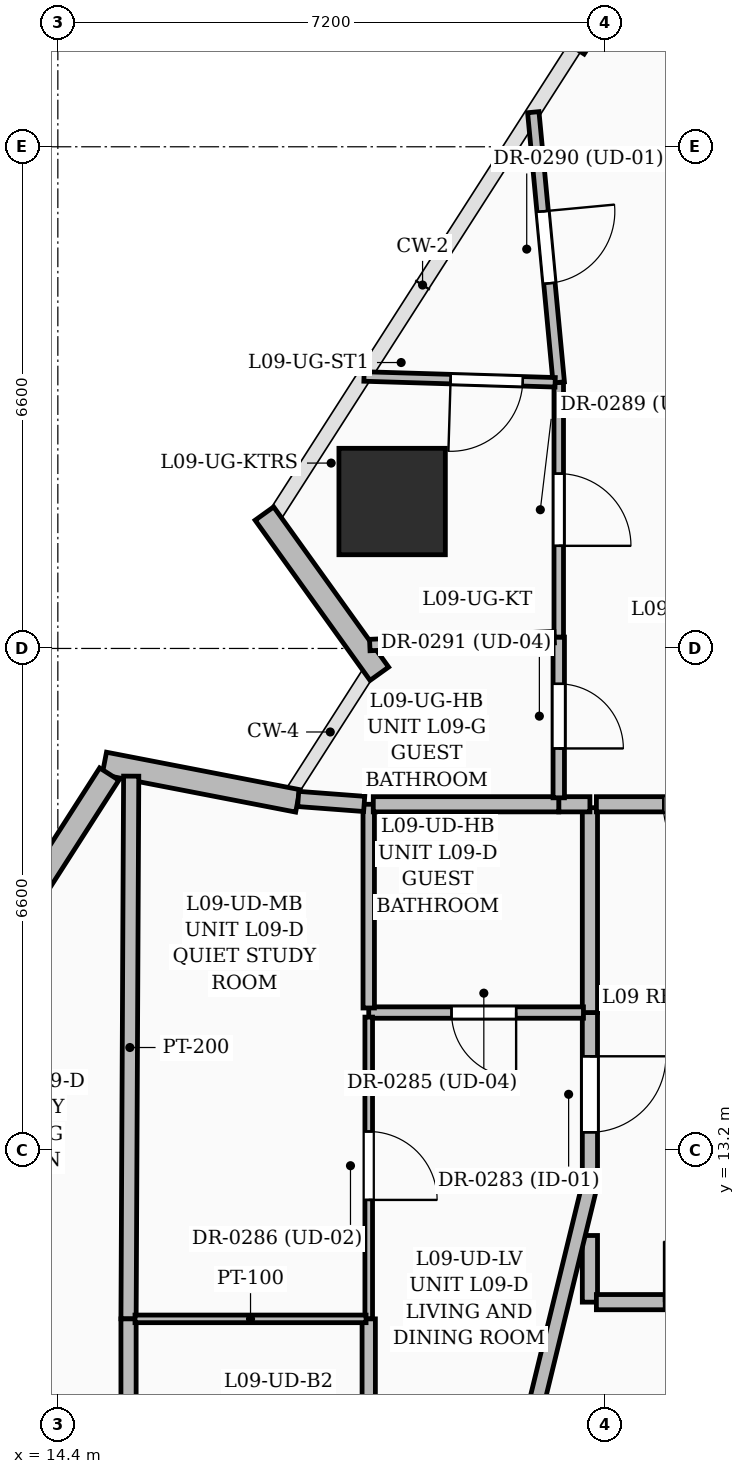
"""IFC4 building model, lengths in metres.
Left out: names, types, materials, properties, quantities, classifications, styles, units other than length and angle.
Written with IfcOpenShell. Run it as: python <this file> out.ifc"""

import sys

from ifc_helpers import new_model, si_unit, direction, frame, frame_2d, origin, origin_2d, place, context, subcontext, project, spatial, rectangle, extrude, element, fill, save


model = new_model("IFC4")
c1 = context("Model", 3, precision=1e-05, world=origin(), true_north=direction((0.0, 1.0)))
c2 = subcontext(c1, "Body", "Model", "MODEL_VIEW")
j1 = project(units=[si_unit("LENGTHUNIT", "METRE"), si_unit("PLANEANGLEUNIT", "RADIAN")], contexts=[c1])
p1 = place(None, origin())
s1 = spatial("IfcSite", under=j1, at=p1, CompositionType="ELEMENT")
p2 = place(p1, origin())
s2 = spatial("IfcBuilding", under=s1, at=p2, CompositionType="ELEMENT")
p3 = place(p2, frame((0.0, 0.0, 42.6)))
s3 = spatial("IfcBuildingStorey", under=s2, at=p3, CompositionType="ELEMENT", Elevation=42.6)
p4 = place(p3, frame((18.798, 21.733, 0.0), z_axis=(0.0, 0.0, 1.0), x_axis=(1.0, 0.0, 0.0)))
e1 = element("IfcColumn", 1, at=p4, inside=s3, PredefinedType="COLUMN", context=c2, shape_type="SweptSolid", body=[
    extrude(rectangle(XDim=1.4, YDim=1.4, at=origin_2d()), origin(), (0.0, 0.0, 1.0), 3.6),
])
p5 = place(p3, frame((15.012, 18.288, 0.0), z_axis=(0.0, 0.0, 1.0), x_axis=(0.981746971615, -0.190191702567, 0.0)))
e2 = element("IfcWall", 2, at=p5, inside=s3, PredefinedType="SOLIDWALL", context=c2, shape_type="SweptSolid", body=[
    extrude(rectangle(XDim=2.593, YDim=0.3, at=frame_2d((1.296, 0.0))), origin(), (0.0, 0.0, 1.0), 2.375),
])
p6 = place(p3, frame((18.63, 19.467, 0.0), z_axis=(0.0, 0.0, 1.0), x_axis=(-0.58299973372, 0.812472344442, 0.0)))
e3 = element("IfcWall", 3, at=p6, inside=s3, PredefinedType="SOLIDWALL", context=c2, shape_type="SweptSolid", body=[
    extrude(rectangle(XDim=2.594, YDim=0.3, at=frame_2d((1.297, 0.0))), origin(), (0.0, 0.0, 1.0), 2.375),
])
p7 = place(p3, frame((21.198, 27.701, 0.0), z_axis=(0.0, 0.0, 1.0), x_axis=(0.539535005594, 0.841963168873, 0.0)))
e4 = element("IfcWall", 4, at=p7, inside=s3, PredefinedType="SOLIDWALL", context=c2, shape_type="SweptSolid", body=[
    extrude(rectangle(XDim=7.412, YDim=0.3, at=frame_2d((3.706, 0.0))), origin(), (0.0, 0.0, 1.0), 3.35),
])
p8 = place(p7, frame((0.675, 0.0, 0.8)))
e5 = element("IfcOpeningElement", 5, at=p8, cuts=e4, PredefinedType="OPENING", context=c2, shape_type="SweptSolid", body=[
    extrude(rectangle(XDim=1.2, YDim=1.8, at=frame_2d((0.6, 0.9))), frame((0.0, 0.16, 0.0), z_axis=(0.0, -1.0, 0.0), x_axis=(1.0, 0.0, 0.0)), (0.0, 0.0, 1.0), 0.32),
])
p9 = place(p7, frame((3.45, 0.0, 0.6)))
e6 = element("IfcOpeningElement", 6, at=p9, cuts=e4, PredefinedType="OPENING", context=c2, shape_type="SweptSolid", body=[
    extrude(rectangle(XDim=2.4, YDim=2.1, at=frame_2d((1.2, 1.05))), frame((0.0, 0.16, 0.0), z_axis=(0.0, -1.0, 0.0), x_axis=(1.0, 0.0, 0.0)), (0.0, 0.0, 1.0), 0.32),
])
p10 = place(p3, frame((11.278, 12.219, 0.0), z_axis=(0.0, 0.0, 1.0), x_axis=(0.539524946774, 0.84196961454, 0.0)))
e7 = element("IfcWall", 7, at=p10, inside=s3, PredefinedType="SOLIDWALL", context=c2, shape_type="SweptSolid", body=[
    extrude(rectangle(XDim=7.041, YDim=0.3, at=frame_2d((3.52, 0.0))), origin(), (0.0, 0.0, 1.0), 3.35),
])
p11 = place(p10, frame((3.1, 0.0, 0.55)))
e8 = element("IfcOpeningElement", 8, at=p11, cuts=e7, PredefinedType="OPENING", context=c2, shape_type="SweptSolid", body=[
    extrude(rectangle(XDim=1.6, YDim=2.2, at=frame_2d((0.8, 1.1))), frame((0.0, 0.16, 0.0), z_axis=(0.0, -1.0, 0.0), x_axis=(1.0, 0.0, 0.0)), (0.0, 0.0, 1.0), 0.32),
])
p12 = place(p3, frame((21.4, 12.077, 0.0), z_axis=(0.0, 0.0, 1.0), x_axis=(0.0, -1.0, 0.0)))
e9 = element("IfcWall", 9, at=p12, inside=s3, PredefinedType="PARTITIONING", context=c2, shape_type="SweptSolid", body=[
    extrude(rectangle(XDim=0.877, YDim=0.2, at=frame_2d((0.438, 0.0))), origin(), (0.0, 0.0, 1.0), 3.35),
])
p13 = place(p3, frame((21.485, 11.2, 0.0), z_axis=(0.0, 0.0, 1.0), x_axis=(1.0, 0.0, 0.0)))
e10 = element("IfcWall", 10, at=p13, inside=s3, PredefinedType="PARTITIONING", context=c2, shape_type="SweptSolid", body=[
    extrude(rectangle(XDim=3.384, YDim=0.2, at=frame_2d((1.692, 0.0))), origin(), (0.0, 0.0, 1.0), 2.787),
])
p14 = place(p13, frame((0.89, 0.0, 0.0)))
e11 = element("IfcOpeningElement", 11, at=p14, cuts=e10, PredefinedType="OPENING", context=c2, shape_type="SweptSolid", body=[
    extrude(rectangle(XDim=1.6, YDim=2.3, at=frame_2d((0.8, 1.15))), frame((0.0, 0.11, 0.0), z_axis=(0.0, -1.0, 0.0), x_axis=(1.0, 0.0, 0.0)), (0.0, 0.0, 1.0), 0.22),
])
p15 = place(p3, frame((21.4, 15.01, 0.0), z_axis=(0.0, 0.0, 1.0), x_axis=(0.0, -1.0, 0.0)))
e12 = element("IfcWall", 12, at=p15, inside=s3, PredefinedType="PARTITIONING", context=c2, shape_type="SweptSolid", body=[
    extrude(rectangle(XDim=2.26, YDim=0.2, at=frame_2d((1.13, 0.0))), origin(), (0.0, 0.0, 1.0), 2.787),
])
p16 = place(p15, frame((0.576, 0.0, 0.0)))
e13 = element("IfcOpeningElement", 13, at=p16, cuts=e12, PredefinedType="OPENING", context=c2, shape_type="SweptSolid", body=[
    extrude(rectangle(XDim=1.0, YDim=2.2, at=frame_2d((0.5, 1.1))), frame((0.0, 0.11, 0.0), z_axis=(0.0, -1.0, 0.0), x_axis=(1.0, 0.0, 0.0)), (0.0, 0.0, 1.0), 0.22),
])
p17 = place(p3, frame((21.4, 17.705, 0.0), z_axis=(0.0, 0.0, 1.0), x_axis=(0.0, -1.0, 0.0)))
e14 = element("IfcWall", 14, at=p17, inside=s3, PredefinedType="PARTITIONING", context=c2, shape_type="SweptSolid", body=[
    extrude(rectangle(XDim=2.695, YDim=0.2, at=frame_2d((1.348, 0.0))), origin(), (0.0, 0.0, 1.0), 2.787),
])
p18 = place(p3, frame((24.33, 17.75, 0.0), z_axis=(0.0, 0.0, 1.0), x_axis=(-1.0, 0.0, 0.0)))
e15 = element("IfcWall", 15, at=p18, inside=s3, PredefinedType="PARTITIONING", context=c2, shape_type="SweptSolid", body=[
    extrude(rectangle(XDim=2.845, YDim=0.2, at=frame_2d((1.422, 0.0))), origin(), (0.0, 0.0, 1.0), 2.279),
])
p19 = place(p18, frame((0.965, 0.0, 0.0)))
e16 = element("IfcOpeningElement", 16, at=p19, cuts=e15, PredefinedType="OPENING", context=c2, shape_type="SweptSolid", body=[
    extrude(rectangle(XDim=1.0, YDim=2.2, at=frame_2d((0.5, 1.1))), frame((0.0, 0.11, 0.0), z_axis=(0.0, -1.0, 0.0), x_axis=(1.0, 0.0, 0.0)), (0.0, 0.0, 1.0), 0.22),
])
p20 = place(p3, frame((15.33, 10.98, 0.0), z_axis=(0.0, 0.0, 1.0), x_axis=(0.004889499098, 0.999988046328, 0.0)))
e17 = element("IfcWall", 17, at=p20, inside=s3, PredefinedType="PARTITIONING", context=c2, shape_type="SweptSolid", body=[
    extrude(rectangle(XDim=7.14, YDim=0.2, at=frame_2d((3.57, 0.0))), origin(), (0.0, 0.0, 1.0), 2.279),
])
p21 = place(p3, frame((15.33, 5.72, 0.0), z_axis=(0.0, 0.0, 1.0), x_axis=(0.0, 1.0, 0.0)))
e18 = element("IfcWall", 18, at=p21, inside=s3, PredefinedType="PARTITIONING", context=c2, shape_type="SweptSolid", body=[
    extrude(rectangle(XDim=5.26, YDim=0.2, at=frame_2d((2.63, 0.0))), origin(), (0.0, 0.0, 1.0), 2.279),
])
p22 = place(p21, frame((2.1, 0.0, 0.0)))
e19 = element("IfcOpeningElement", 19, at=p22, cuts=e18, PredefinedType="OPENING", context=c2, shape_type="SweptSolid", body=[
    extrude(rectangle(XDim=1.0, YDim=2.2, at=frame_2d((0.5, 1.1))), frame((0.0, 0.11, 0.0), z_axis=(0.0, -1.0, 0.0), x_axis=(1.0, 0.0, 0.0)), (0.0, 0.0, 1.0), 0.22),
])
p23 = place(p3, frame((21.4, 12.75, 0.0), z_axis=(0.0, 0.0, 1.0), x_axis=(-0.237009503741, -0.971507331489, 0.0)))
e20 = element("IfcWall", 20, at=p23, inside=s3, PredefinedType="PARTITIONING", context=c2, shape_type="SweptSolid", body=[
    extrude(rectangle(XDim=11.172, YDim=0.2, at=frame_2d((5.586, 0.0))), origin(), (0.0, 0.0, 1.0), 2.279),
])
p24 = place(p3, frame((21.315, 15.01, 0.0), z_axis=(0.0, 0.0, 1.0), x_axis=(-1.0, 0.0, 0.0)))
e21 = element("IfcWall", 21, at=p24, inside=s3, PredefinedType="PARTITIONING", context=c2, shape_type="SweptSolid", body=[
    extrude(rectangle(XDim=2.825, YDim=0.15, at=frame_2d((1.413, 0.0))), origin(), (0.0, 0.0, 1.0), 2.787),
])
p25 = place(p24, frame((0.886, 0.0, 0.0)))
e22 = element("IfcOpeningElement", 22, at=p25, cuts=e21, PredefinedType="OPENING", context=c2, shape_type="SweptSolid", body=[
    extrude(rectangle(XDim=0.85, YDim=2.1, at=frame_2d((0.425, 1.05))), frame((0.0, 0.085, 0.0), z_axis=(0.0, -1.0, 0.0), x_axis=(1.0, 0.0, 0.0)), (0.0, 0.0, 1.0), 0.17),
])
p26 = place(p3, frame((18.49, 14.95, 0.0), z_axis=(0.0, 0.0, 1.0), x_axis=(0.0, -1.0, 0.0)))
e23 = element("IfcWall", 23, at=p26, inside=s3, PredefinedType="PARTITIONING", context=c2, shape_type="SweptSolid", body=[
    extrude(rectangle(XDim=3.97, YDim=0.1, at=frame_2d((1.985, 0.0))), origin(), (0.0, 0.0, 1.0), 2.787),
])
p27 = place(p26, frame((1.505, 0.0, 0.0)))
e24 = element("IfcOpeningElement", 24, at=p27, cuts=e23, PredefinedType="OPENING", context=c2, shape_type="SweptSolid", body=[
    extrude(rectangle(XDim=0.9, YDim=2.15, at=frame_2d((0.45, 1.075))), frame((0.0, 0.06, 0.0), z_axis=(0.0, -1.0, 0.0), x_axis=(1.0, 0.0, 0.0)), (0.0, 0.0, 1.0), 0.12),
])
p28 = place(p3, frame((18.49, 10.98, 0.0), z_axis=(0.0, 0.0, 1.0), x_axis=(0.0, -1.0, 0.0)))
e25 = element("IfcWall", 25, at=p28, inside=s3, PredefinedType="PARTITIONING", context=c2, shape_type="SweptSolid", body=[
    extrude(rectangle(XDim=6.29, YDim=0.175, at=frame_2d((3.145, 0.0))), origin(), (0.0, 0.0, 1.0), 2.279),
])
p29 = place(p28, frame((2.635, 0.0, 0.0)))
e26 = element("IfcOpeningElement", 26, at=p29, cuts=e25, PredefinedType="OPENING", context=c2, shape_type="SweptSolid", body=[
    extrude(rectangle(XDim=0.9, YDim=2.15, at=frame_2d((0.45, 1.075))), frame((0.0, 0.097, 0.0), z_axis=(0.0, -1.0, 0.0), x_axis=(1.0, 0.0, 0.0)), (0.0, 0.0, 1.0), 0.195),
])
p30 = place(p3, frame((18.49, 17.75, 0.0), z_axis=(0.0, 0.0, 1.0), x_axis=(0.0, -1.0, 0.0)))
e27 = element("IfcWall", 27, at=p30, inside=s3, PredefinedType="PARTITIONING", context=c2, shape_type="SweptSolid", body=[
    extrude(rectangle(XDim=2.68, YDim=0.15, at=frame_2d((1.34, 0.0))), origin(), (0.0, 0.0, 1.0), 2.787),
])
p31 = place(p3, frame((21.4, 17.75, 0.0), z_axis=(0.0, 0.0, 1.0), x_axis=(-1.0, 0.0, 0.0)))
e28 = element("IfcWall", 28, at=p31, inside=s3, PredefinedType="PARTITIONING", context=c2, shape_type="SweptSolid", body=[
    extrude(rectangle(XDim=0.41, YDim=0.2, at=frame_2d((0.205, 0.0))), origin(), (0.0, 0.0, 1.0), 3.35),
])
p32 = place(p3, frame((20.99, 17.75, 0.0), z_axis=(0.0, 0.0, 1.0), x_axis=(-1.0, 0.0, 0.0)))
e29 = element("IfcWall", 29, at=p32, inside=s3, PredefinedType="PARTITIONING", context=c2, shape_type="SweptSolid", body=[
    extrude(rectangle(XDim=2.44, YDim=0.2, at=frame_2d((1.22, 0.0))), origin(), (0.0, 0.0, 1.0), 2.787),
])
p33 = place(p3, frame((15.415, 10.98, 0.0), z_axis=(0.0, 0.0, 1.0), x_axis=(1.0, 0.0, 0.0)))
e30 = element("IfcWall", 30, at=p33, inside=s3, PredefinedType="PARTITIONING", context=c2, shape_type="SweptSolid", body=[
    extrude(rectangle(XDim=3.04, YDim=0.1, at=frame_2d((1.52, 0.0))), origin(), (0.0, 0.0, 1.0), 2.279),
])
p34 = place(p3, frame((18.43, 17.754, 0.0), z_axis=(0.0, 0.0, 1.0), x_axis=(-0.997151002859, 0.07543127665, 0.0)))
e31 = element("IfcWall", 31, at=p34, inside=s3, PredefinedType="PARTITIONING", context=c2, shape_type="SweptSolid", body=[
    extrude(rectangle(XDim=0.871, YDim=0.2, at=frame_2d((0.435, 0.0))), origin(), (0.0, 0.0, 1.0), 3.35),
])
p35 = place(p3, frame((20.99, 19.95, 0.0), z_axis=(0.0, 0.0, 1.0), x_axis=(0.0, -1.0, 0.0)))
e32 = element("IfcWall", 32, at=p35, inside=s3, PredefinedType="PARTITIONING", context=c2, shape_type="SweptSolid", body=[
    extrude(rectangle(XDim=2.115, YDim=0.15, at=frame_2d((1.058, 0.0))), origin(), (0.0, 0.0, 1.0), 2.279),
])
p36 = place(p35, frame((0.615, 0.0, 0.0)))
e33 = element("IfcOpeningElement", 33, at=p36, cuts=e32, PredefinedType="OPENING", context=c2, shape_type="SweptSolid", body=[
    extrude(rectangle(XDim=0.85, YDim=2.1, at=frame_2d((0.425, 1.05))), frame((0.0, 0.085, 0.0), z_axis=(0.0, -1.0, 0.0), x_axis=(1.0, 0.0, 0.0)), (0.0, 0.0, 1.0), 0.17),
])
p37 = place(p3, frame((20.99, 23.3, 0.0), z_axis=(0.0, 0.0, 1.0), x_axis=(0.0, -1.0, 0.0)))
e34 = element("IfcWall", 34, at=p37, inside=s3, PredefinedType="PARTITIONING", context=c2, shape_type="SweptSolid", body=[
    extrude(rectangle(XDim=3.35, YDim=0.125, at=frame_2d((1.675, 0.0))), origin(), (0.0, 0.0, 1.0), 2.279),
])
p38 = place(p37, frame((1.2, 0.0, 0.0)))
e35 = element("IfcOpeningElement", 35, at=p38, cuts=e34, PredefinedType="OPENING", context=c2, shape_type="SweptSolid", body=[
    extrude(rectangle(XDim=0.95, YDim=2.2, at=frame_2d((0.475, 1.1))), frame((0.0, 0.072, 0.0), z_axis=(0.0, -1.0, 0.0), x_axis=(1.0, 0.0, 0.0)), (0.0, 0.0, 1.0), 0.145),
])
p39 = place(p3, frame((20.655, 26.855, 0.0), z_axis=(0.0, 0.0, 1.0), x_axis=(0.093808790525, -0.995590232385, 0.0)))
e36 = element("IfcWall", 36, at=p39, inside=s3, PredefinedType="PARTITIONING", context=c2, shape_type="SweptSolid", body=[
    extrude(rectangle(XDim=3.571, YDim=0.15, at=frame_2d((1.785, 0.0))), origin(), (0.0, 0.0, 1.0), 2.37),
])
p40 = place(p39, frame((1.31, 0.0, 0.0)))
e37 = element("IfcOpeningElement", 37, at=p40, cuts=e36, PredefinedType="OPENING", context=c2, shape_type="SweptSolid", body=[
    extrude(rectangle(XDim=0.95, YDim=2.2, at=frame_2d((0.475, 1.1))), frame((0.0, 0.085, 0.0), z_axis=(0.0, -1.0, 0.0), x_axis=(1.0, 0.0, 0.0)), (0.0, 0.0, 1.0), 0.17),
])
p41 = place(p3, frame((20.93, 19.948, 0.0), z_axis=(0.0, 0.0, 1.0), x_axis=(-0.999099471677, -0.042429302309, 0.0)))
e38 = element("IfcWall", 38, at=p41, inside=s3, PredefinedType="PARTITIONING", context=c2, shape_type="SweptSolid", body=[
    extrude(rectangle(XDim=2.428, YDim=0.15, at=frame_2d((1.214, 0.0))), origin(), (0.0, 0.0, 1.0), 2.279),
])
p42 = place(p3, frame((20.942, 23.302, 0.0), z_axis=(0.0, 0.0, 1.0), x_axis=(-0.999538504103, 0.030377274666, 0.0)))
e39 = element("IfcWall", 39, at=p42, inside=s3, PredefinedType="PARTITIONING", context=c2, shape_type="SweptSolid", body=[
    extrude(rectangle(XDim=2.516, YDim=0.125, at=frame_2d((1.258, 0.0))), origin(), (0.0, 0.0, 1.0), 2.37),
])
p43 = place(p42, frame((0.426, 0.0, 0.0)))
e40 = element("IfcOpeningElement", 40, at=p43, cuts=e39, PredefinedType="OPENING", context=c2, shape_type="SweptSolid", body=[
    extrude(rectangle(XDim=0.95, YDim=2.2, at=frame_2d((0.475, 1.1))), frame((0.0, 0.072, 0.0), z_axis=(0.0, -1.0, 0.0), x_axis=(1.0, 0.0, 0.0)), (0.0, 0.0, 1.0), 0.145),
])
p44 = place(p14, origin())
e41 = element("IfcDoor", 41, at=p44, inside=s3, OperationType="DOUBLE_DOOR_SINGLE_SWING", PredefinedType="DOOR", context=c2, shape_type="SweptSolid", body=[
    extrude(rectangle(XDim=1.6, YDim=2.3, at=frame_2d((0.8, 1.15))), frame((0.0, 0.025, 0.0), z_axis=(0.0, -1.0, 0.0), x_axis=(1.0, 0.0, 0.0)), (0.0, 0.0, 1.0), 0.05),
])
fill(e11, e41)
p45 = place(p16, origin())
e42 = element("IfcDoor", 42, at=p45, inside=s3, OperationType="SINGLE_SWING_LEFT", PredefinedType="DOOR", context=c2, shape_type="SweptSolid", body=[
    extrude(rectangle(XDim=1.0, YDim=2.2, at=frame_2d((0.5, 1.1))), frame((0.0, 0.025, 0.0), z_axis=(0.0, -1.0, 0.0), x_axis=(1.0, 0.0, 0.0)), (0.0, 0.0, 1.0), 0.05),
])
fill(e13, e42)
p46 = place(p25, origin())
e43 = element("IfcDoor", 43, at=p46, inside=s3, OperationType="SINGLE_SWING_LEFT", PredefinedType="DOOR", context=c2, shape_type="SweptSolid", body=[
    extrude(rectangle(XDim=0.85, YDim=2.1, at=frame_2d((0.425, 1.05))), frame((0.0, 0.025, 0.0), z_axis=(0.0, -1.0, 0.0), x_axis=(1.0, 0.0, 0.0)), (0.0, 0.0, 1.0), 0.05),
])
fill(e22, e43)
p47 = place(p27, origin())
e44 = element("IfcDoor", 44, at=p47, inside=s3, OperationType="SINGLE_SWING_RIGHT", PredefinedType="DOOR", context=c2, shape_type="SweptSolid", body=[
    extrude(rectangle(XDim=0.9, YDim=2.15, at=frame_2d((0.45, 1.075))), frame((0.0, 0.025, 0.0), z_axis=(0.0, -1.0, 0.0), x_axis=(1.0, 0.0, 0.0)), (0.0, 0.0, 1.0), 0.05),
])
fill(e24, e44)
p48 = place(p19, origin())
e45 = element("IfcDoor", 45, at=p48, inside=s3, OperationType="SINGLE_SWING_LEFT", PredefinedType="DOOR", context=c2, shape_type="SweptSolid", body=[
    extrude(rectangle(XDim=1.0, YDim=2.2, at=frame_2d((0.5, 1.1))), frame((0.0, 0.025, 0.0), z_axis=(0.0, -1.0, 0.0), x_axis=(1.0, 0.0, 0.0)), (0.0, 0.0, 1.0), 0.05),
])
fill(e16, e45)
p49 = place(p38, origin())
e46 = element("IfcDoor", 46, at=p49, inside=s3, OperationType="SINGLE_SWING_RIGHT", PredefinedType="DOOR", context=c2, shape_type="SweptSolid", body=[
    extrude(rectangle(XDim=0.95, YDim=2.2, at=frame_2d((0.475, 1.1))), frame((0.0, 0.025, 0.0), z_axis=(0.0, -1.0, 0.0), x_axis=(1.0, 0.0, 0.0)), (0.0, 0.0, 1.0), 0.05),
])
fill(e35, e46)
p50 = place(p40, origin())
e47 = element("IfcDoor", 47, at=p50, inside=s3, OperationType="SINGLE_SWING_LEFT", PredefinedType="DOOR", context=c2, shape_type="SweptSolid", body=[
    extrude(rectangle(XDim=0.95, YDim=2.2, at=frame_2d((0.475, 1.1))), frame((0.0, 0.025, 0.0), z_axis=(0.0, -1.0, 0.0), x_axis=(1.0, 0.0, 0.0)), (0.0, 0.0, 1.0), 0.05),
])
fill(e37, e47)
p51 = place(p36, origin())
e48 = element("IfcDoor", 48, at=p51, inside=s3, OperationType="SINGLE_SWING_RIGHT", PredefinedType="DOOR", context=c2, shape_type="SweptSolid", body=[
    extrude(rectangle(XDim=0.85, YDim=2.1, at=frame_2d((0.425, 1.05))), frame((0.0, 0.025, 0.0), z_axis=(0.0, -1.0, 0.0), x_axis=(1.0, 0.0, 0.0)), (0.0, 0.0, 1.0), 0.05),
])
fill(e33, e48)
p52 = place(p43, origin())
e49 = element("IfcDoor", 49, at=p52, inside=s3, OperationType="SINGLE_SWING_RIGHT", PredefinedType="DOOR", context=c2, shape_type="SweptSolid", body=[
    extrude(rectangle(XDim=0.95, YDim=2.2, at=frame_2d((0.475, 1.1))), frame((0.0, 0.025, 0.0), z_axis=(0.0, -1.0, 0.0), x_axis=(1.0, 0.0, 0.0)), (0.0, 0.0, 1.0), 0.05),
])
fill(e40, e49)
save(model, sys.argv[1])
